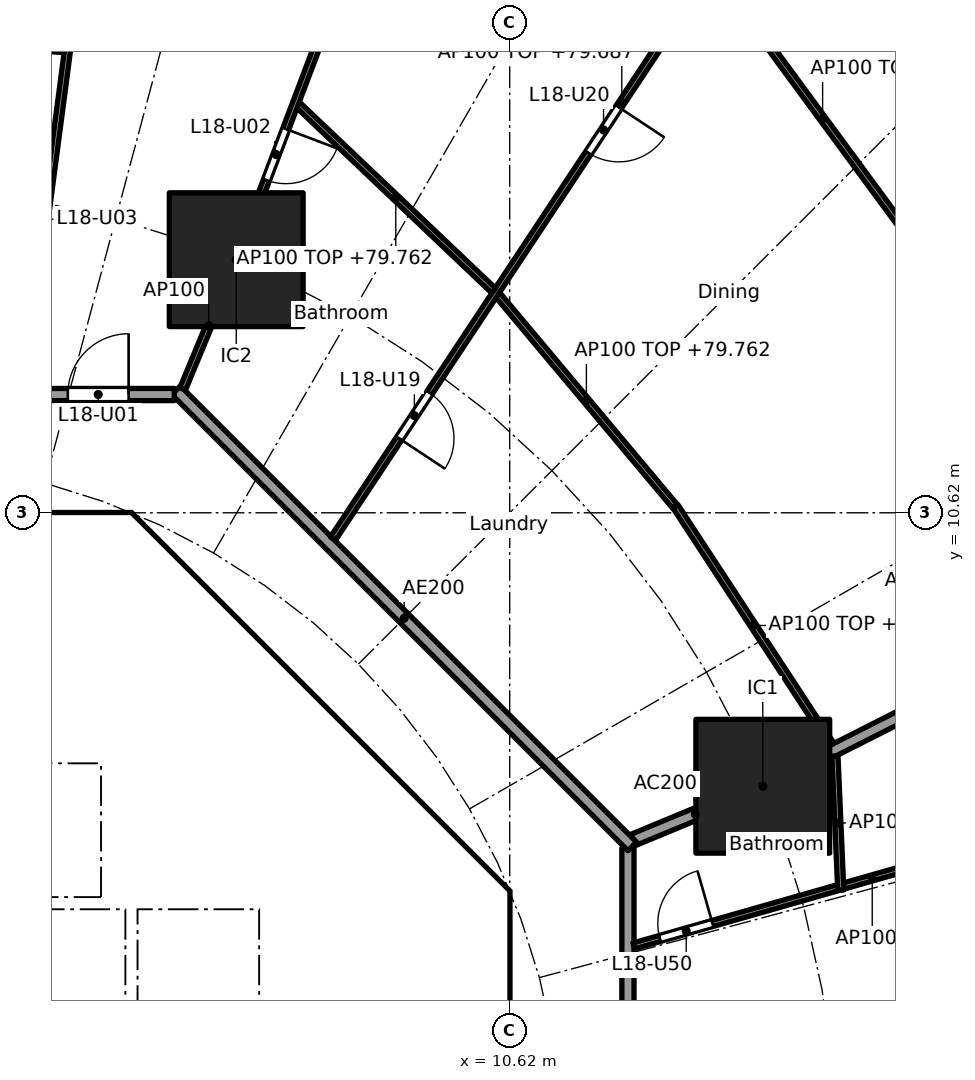
"""IFC4 building model, lengths in metres.
Left out: names, types, materials, properties, quantities, classifications, styles, units other than length and angle.
Written with IfcOpenShell. Run it as: python <this file> out.ifc"""

import sys

from ifc_helpers import new_model, si_unit, direction, frame, frame_2d, origin, origin_2d, place, context, subcontext, project, spatial, polyline, rectangle, outline, extrude, element, fill, save


model = new_model("IFC4")
c1 = context("Model", 3, precision=1e-05, world=origin(), true_north=direction((0.0, 1.0)))
c2 = subcontext(c1, "Body", "Model", "MODEL_VIEW")
j1 = project(units=[si_unit("LENGTHUNIT", "METRE"), si_unit("PLANEANGLEUNIT", "RADIAN")], contexts=[c1])
p1 = place(None, origin())
s1 = spatial("IfcSite", under=j1, at=p1, CompositionType="ELEMENT")
p2 = place(p1, origin())
s2 = spatial("IfcBuilding", under=s1, at=p2, CompositionType="ELEMENT")
p3 = place(p2, frame((0.0, 0.0, 77.0)))
s3 = spatial("IfcBuildingStorey", under=s2, at=p3, CompositionType="ELEMENT", Elevation=77.0)
for number, where, z_axis, x_axis in (
    (1, (14.782, 6.123, 0.0), (0.0, 0.0, 1.0), (1.0, 0.0, 0.0)),
    (2, (6.123, 14.782, 0.0), (0.0, 0.0, 1.0), (1.0, 0.0, 0.0)),
):
    element("IfcColumn", number, at=place(p3, frame(where, z_axis=z_axis, x_axis=x_axis)), inside=s3, PredefinedType="COLUMN", context=c2, shape_type="SweptSolid", body=[
        extrude(rectangle(XDim=2.2, YDim=2.2, at=origin_2d()), origin(), (0.0, 0.0, 1.0), 3.7),
    ])
p4 = place(p3, frame((9.988, 4.613, 0.0), z_axis=(0.0, 0.0, 1.0), x_axis=(-0.707106781187, 0.707106781187, 0.0)))
e3 = element("IfcWall", 3, at=p4, inside=s3, PredefinedType="SHEAR", context=c2, shape_type="SweptSolid", body=[
    extrude(rectangle(XDim=7.602, YDim=0.6, at=frame_2d((3.801, 0.0))), origin(), (0.0, 0.0, 1.0), 3.44),
])
p5 = place(p4, frame((3.201, 0.0, 0.0)))
e4 = element("IfcOpeningElement", 4, at=p5, cuts=e3, PredefinedType="OPENING", context=c2, shape_type="SweptSolid", body=[
    extrude(rectangle(XDim=1.2, YDim=2.1, at=frame_2d((0.6, 1.05))), frame((0.0, 0.31, 0.0), z_axis=(0.0, -1.0, 0.0), x_axis=(1.0, 0.0, 0.0)), (0.0, 0.0, 1.0), 0.62),
])
p6 = place(p3, frame((4.0, 4.3, 0.0), z_axis=(0.0, 0.0, 1.0), x_axis=(0.0, 1.0, 0.0)))
e5 = element("IfcWall", 5, at=p6, inside=s3, PredefinedType="SOLIDWALL", context=c2, shape_type="SweptSolid", body=[
    extrude(rectangle(XDim=2.2, YDim=0.2, at=frame_2d((1.1, 0.0))), origin(), (0.0, 0.0, 1.0), 3.44),
])
p7 = place(p6, frame((0.55, 0.0, 0.0)))
e6 = element("IfcOpeningElement", 6, at=p7, cuts=e5, PredefinedType="OPENING", context=c2, shape_type="SweptSolid", body=[
    extrude(rectangle(XDim=1.1, YDim=2.1, at=frame_2d((0.55, 1.05))), frame((0.0, 0.11, 0.0), z_axis=(0.0, -1.0, 0.0), x_axis=(1.0, 0.0, 0.0)), (0.0, 0.0, 1.0), 0.22),
])
p8 = place(p3, frame((6.7, 4.0, 0.0), z_axis=(0.0, 0.0, 1.0), x_axis=(1.0, 0.0, 0.0)))
e7 = element("IfcWall", 7, at=p8, inside=s3, PredefinedType="SOLIDWALL", context=c2, shape_type="SweptSolid", body=[
    extrude(rectangle(XDim=3.325, YDim=0.2, at=frame_2d((1.662, 0.0))), origin(), (0.0, 0.0, 1.0), 3.44),
])
p9 = place(p8, frame((1.25, 0.0, 0.0)))
e8 = element("IfcOpeningElement", 8, at=p9, cuts=e7, PredefinedType="OPENING", context=c2, shape_type="SweptSolid", body=[
    extrude(rectangle(XDim=1.1, YDim=2.1, at=frame_2d((0.55, 1.05))), frame((0.0, 0.11, 0.0), z_axis=(0.0, -1.0, 0.0), x_axis=(1.0, 0.0, 0.0)), (0.0, 0.0, 1.0), 0.22),
])
p10 = place(p3, frame((4.0, 7.025, 0.0), z_axis=(0.0, 0.0, 1.0), x_axis=(0.0, 1.0, 0.0)))
e9 = element("IfcWall", 9, at=p10, inside=s3, PredefinedType="SOLIDWALL", context=c2, shape_type="SweptSolid", body=[
    extrude(rectangle(XDim=3.0, YDim=0.2, at=frame_2d((1.5, 0.0))), origin(), (0.0, 0.0, 1.0), 3.44),
])
p11 = place(p10, frame((0.925, 0.0, 0.0)))
e10 = element("IfcOpeningElement", 10, at=p11, cuts=e9, PredefinedType="OPENING", context=c2, shape_type="SweptSolid", body=[
    extrude(rectangle(XDim=1.1, YDim=2.1, at=frame_2d((0.55, 1.05))), frame((0.0, 0.11, 0.0), z_axis=(0.0, -1.0, 0.0), x_axis=(1.0, 0.0, 0.0)), (0.0, 0.0, 1.0), 0.22),
])
p12 = place(p3, origin())
e11 = element("IfcWall", 11, at=p12, inside=s3, PredefinedType="SHEAR", context=c2, shape_type="SweptSolid", body=[
    extrude(outline(polyline([(-4.152, 10.025), (-4.401, 9.776), (-4.825, 10.2), (-4.401, 10.625), (4.401, 10.625), (4.825, 10.2), (4.401, 9.776), (4.152, 10.025), (-4.152, 10.025)])), origin(), (0.0, 0.0, 1.0), 3.44),
])
p13 = place(p3, origin())
e12 = element("IfcWall", 12, at=p13, inside=s3, PredefinedType="SHEAR", context=c2, shape_type="SweptSolid", body=[
    extrude(outline(polyline([(9.776, -4.401), (10.025, -4.152), (10.025, -3.801), (10.025, 4.152), (9.776, 4.401), (10.2, 4.825), (10.625, 4.401), (10.625, -4.401), (10.2, -4.825), (9.776, -4.401)])), origin(), (0.0, 0.0, 1.0), 3.44),
])
p14 = place(p3, origin())
e13 = element("IfcWall", 13, at=p14, inside=s3, PredefinedType="SOLIDWALL", context=c2, shape_type="SweptSolid", body=[
    extrude(outline(polyline([(-6.5, 2.1), (-6.7, 2.1), (-6.7, 4.3), (6.7, 4.3), (6.7, 2.1), (6.5, 2.1), (6.5, 4.1), (4.5, 4.1), (4.5, 2.1), (4.3, 2.1), (4.3, 4.1), (2.3, 4.1), (2.3, 2.1), (2.1, 2.1), (2.1, 4.1), (0.1, 4.1), (0.1, 2.1), (-0.1, 2.1), (-0.1, 4.1), (-2.1, 4.1), (-2.1, 2.1), (-2.3, 2.1), (-2.3, 4.1), (-4.3, 4.1), (-4.3, 2.1), (-4.5, 2.1), (-4.5, 4.1), (-6.5, 4.1), (-6.5, 2.1)])), origin(), (0.0, 0.0, 1.0), 3.44),
])
p15 = place(p3, origin())
e14 = element("IfcWall", 14, at=p15, inside=s3, PredefinedType="SOLIDWALL", context=c2, shape_type="SweptSolid", body=[
    extrude(outline(polyline([(4.1, 6.5), (-4.1, 6.5), (-4.1, 7.025), (4.1, 7.025), (4.1, 6.5)])), origin(), (0.0, 0.0, 1.0), 3.44),
])
p16 = place(p3, origin())
e15 = element("IfcWall", 15, at=p16, inside=s3, PredefinedType="SOLIDWALL", context=c2, shape_type="SweptSolid", body=[
    extrude(outline(polyline([(7.025, -3.9), (6.7, -3.9), (6.7, 3.9), (7.025, 3.9), (7.025, -3.9)])), origin(), (0.0, 0.0, 1.0), 3.44),
])
p17 = place(p3, frame((12.657, 5.243, 0.0), z_axis=(0.0, 0.0, 1.0), x_axis=(0.923876145736, 0.382691608661, 0.0)))
e16 = element("IfcWall", 16, at=p17, inside=s3, PredefinedType="PARTITIONING", context=c2, shape_type="SweptSolid", body=[
    extrude(rectangle(XDim=2.2, YDim=0.2, at=frame_2d((1.1, 0.0))), origin(), (0.0, 0.0, 1.0), 3.44),
])
p18 = place(p3, frame((14.827, 6.146, 0.0), z_axis=(0.0, 0.0, 1.0), x_axis=(0.892068075337, 0.451901038906, 0.0)))
e17 = element("IfcWall", 17, at=p18, inside=s3, PredefinedType="PARTITIONING", context=c2, shape_type="SweptSolid", body=[
    extrude(rectangle(XDim=10.32, YDim=0.2, at=frame_2d((5.16, 0.0))), origin(), (0.0, 0.0, 1.0), 2.762),
])
p19 = place(p3, frame((12.565, -5.104, 0.0), z_axis=(0.0, 0.0, 1.0), x_axis=(0.0, 1.0, 0.0)))
e18 = element("IfcWall", 18, at=p19, inside=s3, PredefinedType="PARTITIONING", context=c2, shape_type="SweptSolid", body=[
    extrude(rectangle(XDim=10.209, YDim=0.2, at=frame_2d((5.104, 0.0))), origin(), (0.0, 0.0, 1.0), 3.44),
])
p20 = place(p19, frame((6.339, 0.0, 0.0)))
e19 = element("IfcOpeningElement", 19, at=p20, cuts=e18, PredefinedType="OPENING", context=c2, shape_type="SweptSolid", body=[
    extrude(rectangle(XDim=1.0, YDim=2.1, at=frame_2d((0.5, 1.05))), frame((0.0, 0.11, 0.0), z_axis=(0.0, -1.0, 0.0), x_axis=(1.0, 0.0, 0.0)), (0.0, 0.0, 1.0), 0.22),
])
p21 = place(p3, frame((12.635, 5.134, 0.0), z_axis=(0.0, 0.0, 1.0), x_axis=(-0.707106781187, 0.707106781187, 0.0)))
e20 = element("IfcWall", 20, at=p21, inside=s3, PredefinedType="PARTITIONING", context=c2, shape_type="SweptSolid", body=[
    extrude(rectangle(XDim=10.609, YDim=0.2, at=frame_2d((5.305, 0.0))), origin(), (0.0, 0.0, 1.0), 3.44),
])
p22 = place(p3, frame((5.104, 12.565, 0.0), z_axis=(0.0, 0.0, 1.0), x_axis=(-1.0, 0.0, 0.0)))
e21 = element("IfcWall", 21, at=p22, inside=s3, PredefinedType="PARTITIONING", context=c2, shape_type="SweptSolid", body=[
    extrude(rectangle(XDim=10.409, YDim=0.2, at=frame_2d((5.205, 0.0))), origin(), (0.0, 0.0, 1.0), 3.44),
])
p23 = place(p22, frame((0.751, 0.0, 0.0)))
e22 = element("IfcOpeningElement", 22, at=p23, cuts=e21, PredefinedType="OPENING", context=c2, shape_type="SweptSolid", body=[
    extrude(rectangle(XDim=1.0, YDim=2.1, at=frame_2d((0.5, 1.05))), frame((0.0, 0.11, 0.0), z_axis=(0.0, -1.0, 0.0), x_axis=(1.0, 0.0, 0.0)), (0.0, 0.0, 1.0), 0.22),
])
p24 = place(p3, frame((12.661, 3.497, 0.0), z_axis=(0.0, 0.0, 1.0), x_axis=(0.961626678623, 0.274361314621, 0.0)))
e23 = element("IfcWall", 23, at=p24, inside=s3, PredefinedType="PARTITIONING", context=c2, shape_type="SweptSolid", body=[
    extrude(rectangle(XDim=8.156, YDim=0.1, at=frame_2d((4.078, 0.0))), origin(), (0.0, 0.0, 1.0), 2.687),
])
p25 = place(p24, frame((0.446, 0.0, 0.0)))
e24 = element("IfcOpeningElement", 24, at=p25, cuts=e23, PredefinedType="OPENING", context=c2, shape_type="SweptSolid", body=[
    extrude(rectangle(XDim=0.9, YDim=2.1, at=frame_2d((0.45, 1.05))), frame((0.0, 0.06, 0.0), z_axis=(0.0, -1.0, 0.0), x_axis=(1.0, 0.0, 0.0)), (0.0, 0.0, 1.0), 0.12),
])
p26 = place(p24, frame((5.39, 0.0, 0.0)))
e25 = element("IfcOpeningElement", 25, at=p26, cuts=e23, PredefinedType="OPENING", context=c2, shape_type="SweptSolid", body=[
    extrude(rectangle(XDim=0.9, YDim=2.1, at=frame_2d((0.45, 1.05))), frame((0.0, 0.06, 0.0), z_axis=(0.0, -1.0, 0.0), x_axis=(1.0, 0.0, 0.0)), (0.0, 0.0, 1.0), 0.12),
])
p27 = place(p3, frame((16.064, 4.415, 0.0), z_axis=(0.0, 0.0, 1.0), x_axis=(-0.043101501373, 0.999070698489, 0.0)))
e26 = element("IfcWall", 26, at=p27, inside=s3, PredefinedType="PARTITIONING", context=c2, shape_type="SweptSolid", body=[
    extrude(rectangle(XDim=2.209, YDim=0.1, at=frame_2d((1.104, 0.0))), origin(), (0.0, 0.0, 1.0), 3.44),
])
p28 = place(p3, frame((15.91, 6.806, 0.0), z_axis=(0.0, 0.0, 1.0), x_axis=(-0.547468243486, 0.836826458936, 0.0)))
e27 = element("IfcWall", 27, at=p28, inside=s3, PredefinedType="PARTITIONING", context=c2, shape_type="SweptSolid", body=[
    extrude(rectangle(XDim=4.688, YDim=0.1, at=frame_2d((2.344, 0.0))), origin(), (0.0, 0.0, 1.0), 2.762),
])
p29 = place(p3, frame((13.339, 10.725, 0.0), z_axis=(0.0, 0.0, 1.0), x_axis=(-0.642515455924, 0.766272724882, 0.0)))
e28 = element("IfcWall", 28, at=p29, inside=s3, PredefinedType="PARTITIONING", context=c2, shape_type="SweptSolid", body=[
    extrude(rectangle(XDim=4.537, YDim=0.1, at=frame_2d((2.269, 0.0))), origin(), (0.0, 0.0, 1.0), 2.762),
])
p30 = place(p3, frame((17.567, 14.653, 0.0), z_axis=(0.0, 0.0, 1.0), x_axis=(-0.592391983588, 0.80564988536, 0.0)))
e29 = element("IfcWall", 29, at=p30, inside=s3, PredefinedType="PARTITIONING", context=c2, shape_type="SweptSolid", body=[
    extrude(rectangle(XDim=6.08, YDim=0.1, at=frame_2d((3.04, 0.0))), origin(), (0.0, 0.0, 1.0), 2.762),
])
p31 = place(p3, frame((7.713, 10.195, 0.0), z_axis=(0.0, 0.0, 1.0), x_axis=(0.552111071171, 0.833770571015, 0.0)))
e30 = element("IfcWall", 30, at=p31, inside=s3, PredefinedType="PARTITIONING", context=c2, shape_type="SweptSolid", body=[
    extrude(rectangle(XDim=17.208, YDim=0.1, at=frame_2d((8.604, 0.0))), origin(), (0.0, 0.0, 1.0), 2.687),
])
p32 = place(p31, frame((1.976, 0.0, 0.0)))
e31 = element("IfcOpeningElement", 31, at=p32, cuts=e30, PredefinedType="OPENING", context=c2, shape_type="SweptSolid", body=[
    extrude(rectangle(XDim=0.9, YDim=2.1, at=frame_2d((0.45, 1.05))), frame((0.0, 0.06, 0.0), z_axis=(0.0, -1.0, 0.0), x_axis=(1.0, 0.0, 0.0)), (0.0, 0.0, 1.0), 0.12),
])
p33 = place(p31, frame((7.611, 0.0, 0.0)))
e32 = element("IfcOpeningElement", 32, at=p33, cuts=e30, PredefinedType="OPENING", context=c2, shape_type="SweptSolid", body=[
    extrude(rectangle(XDim=0.9, YDim=2.1, at=frame_2d((0.45, 1.05))), frame((0.0, 0.06, 0.0), z_axis=(0.0, -1.0, 0.0), x_axis=(1.0, 0.0, 0.0)), (0.0, 0.0, 1.0), 0.12),
])
p34 = place(p3, frame((10.355, 14.274, 0.0), z_axis=(0.0, 0.0, 1.0), x_axis=(-0.725219204328, 0.688518050361, 0.0)))
e33 = element("IfcWall", 33, at=p34, inside=s3, PredefinedType="PARTITIONING", context=c2, shape_type="SweptSolid", body=[
    extrude(rectangle(XDim=4.437, YDim=0.1, at=frame_2d((2.219, 0.0))), origin(), (0.0, 0.0, 1.0), 2.762),
])
p35 = place(p3, frame((5.243, 12.657, 0.0), z_axis=(0.0, 0.0, 1.0), x_axis=(0.382719158442, 0.923864733477, 0.0)))
e34 = element("IfcWall", 34, at=p35, inside=s3, PredefinedType="PARTITIONING", context=c2, shape_type="SweptSolid", body=[
    extrude(rectangle(XDim=2.25, YDim=0.1, at=frame_2d((1.125, 0.0))), origin(), (0.0, 0.0, 1.0), 3.44),
])
p36 = place(p3, frame((6.141, 14.829, 0.0), z_axis=(0.0, 0.0, 1.0), x_axis=(0.354477134193, 0.935064682968, 0.0)))
e35 = element("IfcWall", 35, at=p36, inside=s3, PredefinedType="PARTITIONING", context=c2, shape_type="SweptSolid", body=[
    extrude(rectangle(XDim=15.626, YDim=0.1, at=frame_2d((7.813, 0.0))), origin(), (0.0, 0.0, 1.0), 2.762),
])
p37 = place(p36, frame((1.35, 0.0, 0.0)))
e36 = element("IfcOpeningElement", 36, at=p37, cuts=e35, PredefinedType="OPENING", context=c2, shape_type="SweptSolid", body=[
    extrude(rectangle(XDim=0.9, YDim=2.1, at=frame_2d((0.45, 1.05))), frame((0.0, 0.06, 0.0), z_axis=(0.0, -1.0, 0.0), x_axis=(1.0, 0.0, 0.0)), (0.0, 0.0, 1.0), 0.12),
])
p38 = place(p36, frame((5.606, 0.0, 0.0)))
e37 = element("IfcOpeningElement", 37, at=p38, cuts=e35, PredefinedType="OPENING", context=c2, shape_type="SweptSolid", body=[
    extrude(rectangle(XDim=0.9, YDim=2.1, at=frame_2d((0.45, 1.05))), frame((0.0, 0.06, 0.0), z_axis=(0.0, -1.0, 0.0), x_axis=(1.0, 0.0, 0.0)), (0.0, 0.0, 1.0), 0.12),
])
p39 = place(p3, frame((2.615, 12.664, 0.0), z_axis=(0.0, 0.0, 1.0), x_axis=(0.130614967904, 0.99143316979, 0.0)))
e38 = element("IfcWall", 38, at=p39, inside=s3, PredefinedType="PARTITIONING", context=c2, shape_type="SweptSolid", body=[
    extrude(rectangle(XDim=20.034, YDim=0.1, at=frame_2d((10.017, 0.0))), origin(), (0.0, 0.0, 1.0), 2.687),
])
p40 = place(p39, frame((2.359, 0.0, 0.0)))
e39 = element("IfcOpeningElement", 39, at=p40, cuts=e38, PredefinedType="OPENING", context=c2, shape_type="SweptSolid", body=[
    extrude(rectangle(XDim=0.9, YDim=2.1, at=frame_2d((0.45, 1.05))), frame((0.0, 0.06, 0.0), z_axis=(0.0, -1.0, 0.0), x_axis=(1.0, 0.0, 0.0)), (0.0, 0.0, 1.0), 0.12),
])
p41 = place(p39, frame((8.873, 0.0, 0.0)))
e40 = element("IfcOpeningElement", 40, at=p41, cuts=e38, PredefinedType="OPENING", context=c2, shape_type="SweptSolid", body=[
    extrude(rectangle(XDim=0.9, YDim=2.1, at=frame_2d((0.45, 1.05))), frame((0.0, 0.06, 0.0), z_axis=(0.0, -1.0, 0.0), x_axis=(1.0, 0.0, 0.0)), (0.0, 0.0, 1.0), 0.12),
])
p42 = place(p3, frame((3.299, 18.237, 0.0), z_axis=(0.0, 0.0, 1.0), x_axis=(-0.997152243414, 0.075414875552, 0.0)))
e41 = element("IfcWall", 41, at=p42, inside=s3, PredefinedType="PARTITIONING", context=c2, shape_type="SweptSolid", body=[
    extrude(rectangle(XDim=3.846, YDim=0.1, at=frame_2d((1.923, 0.0))), origin(), (0.0, 0.0, 1.0), 2.762),
])
p43 = place(p7, origin())
e42 = element("IfcDoor", 42, at=p43, inside=s3, OperationType="DOUBLE_DOOR_SLIDING", PredefinedType="DOOR", context=c2, shape_type="SweptSolid", body=[
    extrude(rectangle(XDim=1.1, YDim=2.1, at=frame_2d((0.55, 1.05))), frame((0.0, 0.025, 0.0), z_axis=(0.0, -1.0, 0.0), x_axis=(1.0, 0.0, 0.0)), (0.0, 0.0, 1.0), 0.05),
])
fill(e6, e42)
p44 = place(p9, frame((1.1, 0.0, 0.0), x_axis=(-1.0, 0.0, 0.0)))
e43 = element("IfcDoor", 43, at=p44, inside=s3, OperationType="SINGLE_SWING_LEFT", PredefinedType="DOOR", context=c2, shape_type="SweptSolid", body=[
    extrude(rectangle(XDim=1.1, YDim=2.1, at=frame_2d((0.55, 1.05))), frame((0.0, 0.025, 0.0), z_axis=(0.0, -1.0, 0.0), x_axis=(1.0, 0.0, 0.0)), (0.0, 0.0, 1.0), 0.05),
])
fill(e8, e43)
p45 = place(p11, origin())
e44 = element("IfcDoor", 44, at=p45, inside=s3, OperationType="SINGLE_SWING_RIGHT", PredefinedType="DOOR", context=c2, shape_type="SweptSolid", body=[
    extrude(rectangle(XDim=1.1, YDim=2.1, at=frame_2d((0.55, 1.05))), frame((0.0, 0.025, 0.0), z_axis=(0.0, -1.0, 0.0), x_axis=(1.0, 0.0, 0.0)), (0.0, 0.0, 1.0), 0.05),
])
fill(e10, e44)
p46 = place(p5, origin())
e45 = element("IfcDoor", 45, at=p46, inside=s3, OperationType="SINGLE_SWING_LEFT", PredefinedType="DOOR", context=c2, shape_type="SweptSolid", body=[
    extrude(rectangle(XDim=1.2, YDim=2.1, at=frame_2d((0.6, 1.05))), frame((0.0, 0.025, 0.0), z_axis=(0.0, -1.0, 0.0), x_axis=(1.0, 0.0, 0.0)), (0.0, 0.0, 1.0), 0.05),
])
fill(e4, e45)
p47 = place(p23, frame((1.0, 0.0, 0.0), x_axis=(-1.0, 0.0, 0.0)))
e46 = element("IfcDoor", 46, at=p47, inside=s3, OperationType="SINGLE_SWING_RIGHT", PredefinedType="DOOR", context=c2, shape_type="SweptSolid", body=[
    extrude(rectangle(XDim=1.0, YDim=2.1, at=frame_2d((0.5, 1.05))), frame((0.0, 0.025, 0.0), z_axis=(0.0, -1.0, 0.0), x_axis=(1.0, 0.0, 0.0)), (0.0, 0.0, 1.0), 0.05),
])
fill(e22, e46)
p48 = place(p37, frame((0.9, 0.0, 0.0), x_axis=(-1.0, 0.0, 0.0)))
e47 = element("IfcDoor", 47, at=p48, inside=s3, OperationType="SINGLE_SWING_LEFT", PredefinedType="DOOR", context=c2, shape_type="SweptSolid", body=[
    extrude(rectangle(XDim=0.9, YDim=2.1, at=frame_2d((0.45, 1.05))), frame((0.0, 0.025, 0.0), z_axis=(0.0, -1.0, 0.0), x_axis=(1.0, 0.0, 0.0)), (0.0, 0.0, 1.0), 0.05),
])
fill(e36, e47)
p49 = place(p32, frame((0.9, 0.0, 0.0), x_axis=(-1.0, 0.0, 0.0)))
e48 = element("IfcDoor", 48, at=p49, inside=s3, OperationType="SINGLE_SWING_RIGHT", PredefinedType="DOOR", context=c2, shape_type="SweptSolid", body=[
    extrude(rectangle(XDim=0.9, YDim=2.1, at=frame_2d((0.45, 1.05))), frame((0.0, 0.025, 0.0), z_axis=(0.0, -1.0, 0.0), x_axis=(1.0, 0.0, 0.0)), (0.0, 0.0, 1.0), 0.05),
])
fill(e31, e48)
p50 = place(p33, frame((0.9, 0.0, 0.0), x_axis=(-1.0, 0.0, 0.0)))
e49 = element("IfcDoor", 49, at=p50, inside=s3, OperationType="SINGLE_SWING_LEFT", PredefinedType="DOOR", context=c2, shape_type="SweptSolid", body=[
    extrude(rectangle(XDim=0.9, YDim=2.1, at=frame_2d((0.45, 1.05))), frame((0.0, 0.025, 0.0), z_axis=(0.0, -1.0, 0.0), x_axis=(1.0, 0.0, 0.0)), (0.0, 0.0, 1.0), 0.05),
])
fill(e32, e49)
p51 = place(p25, origin())
e50 = element("IfcDoor", 50, at=p51, inside=s3, OperationType="SINGLE_SWING_RIGHT", PredefinedType="DOOR", context=c2, shape_type="SweptSolid", body=[
    extrude(rectangle(XDim=0.9, YDim=2.1, at=frame_2d((0.45, 1.05))), frame((0.0, 0.025, 0.0), z_axis=(0.0, -1.0, 0.0), x_axis=(1.0, 0.0, 0.0)), (0.0, 0.0, 1.0), 0.05),
])
fill(e24, e50)
save(model, sys.argv[1])
